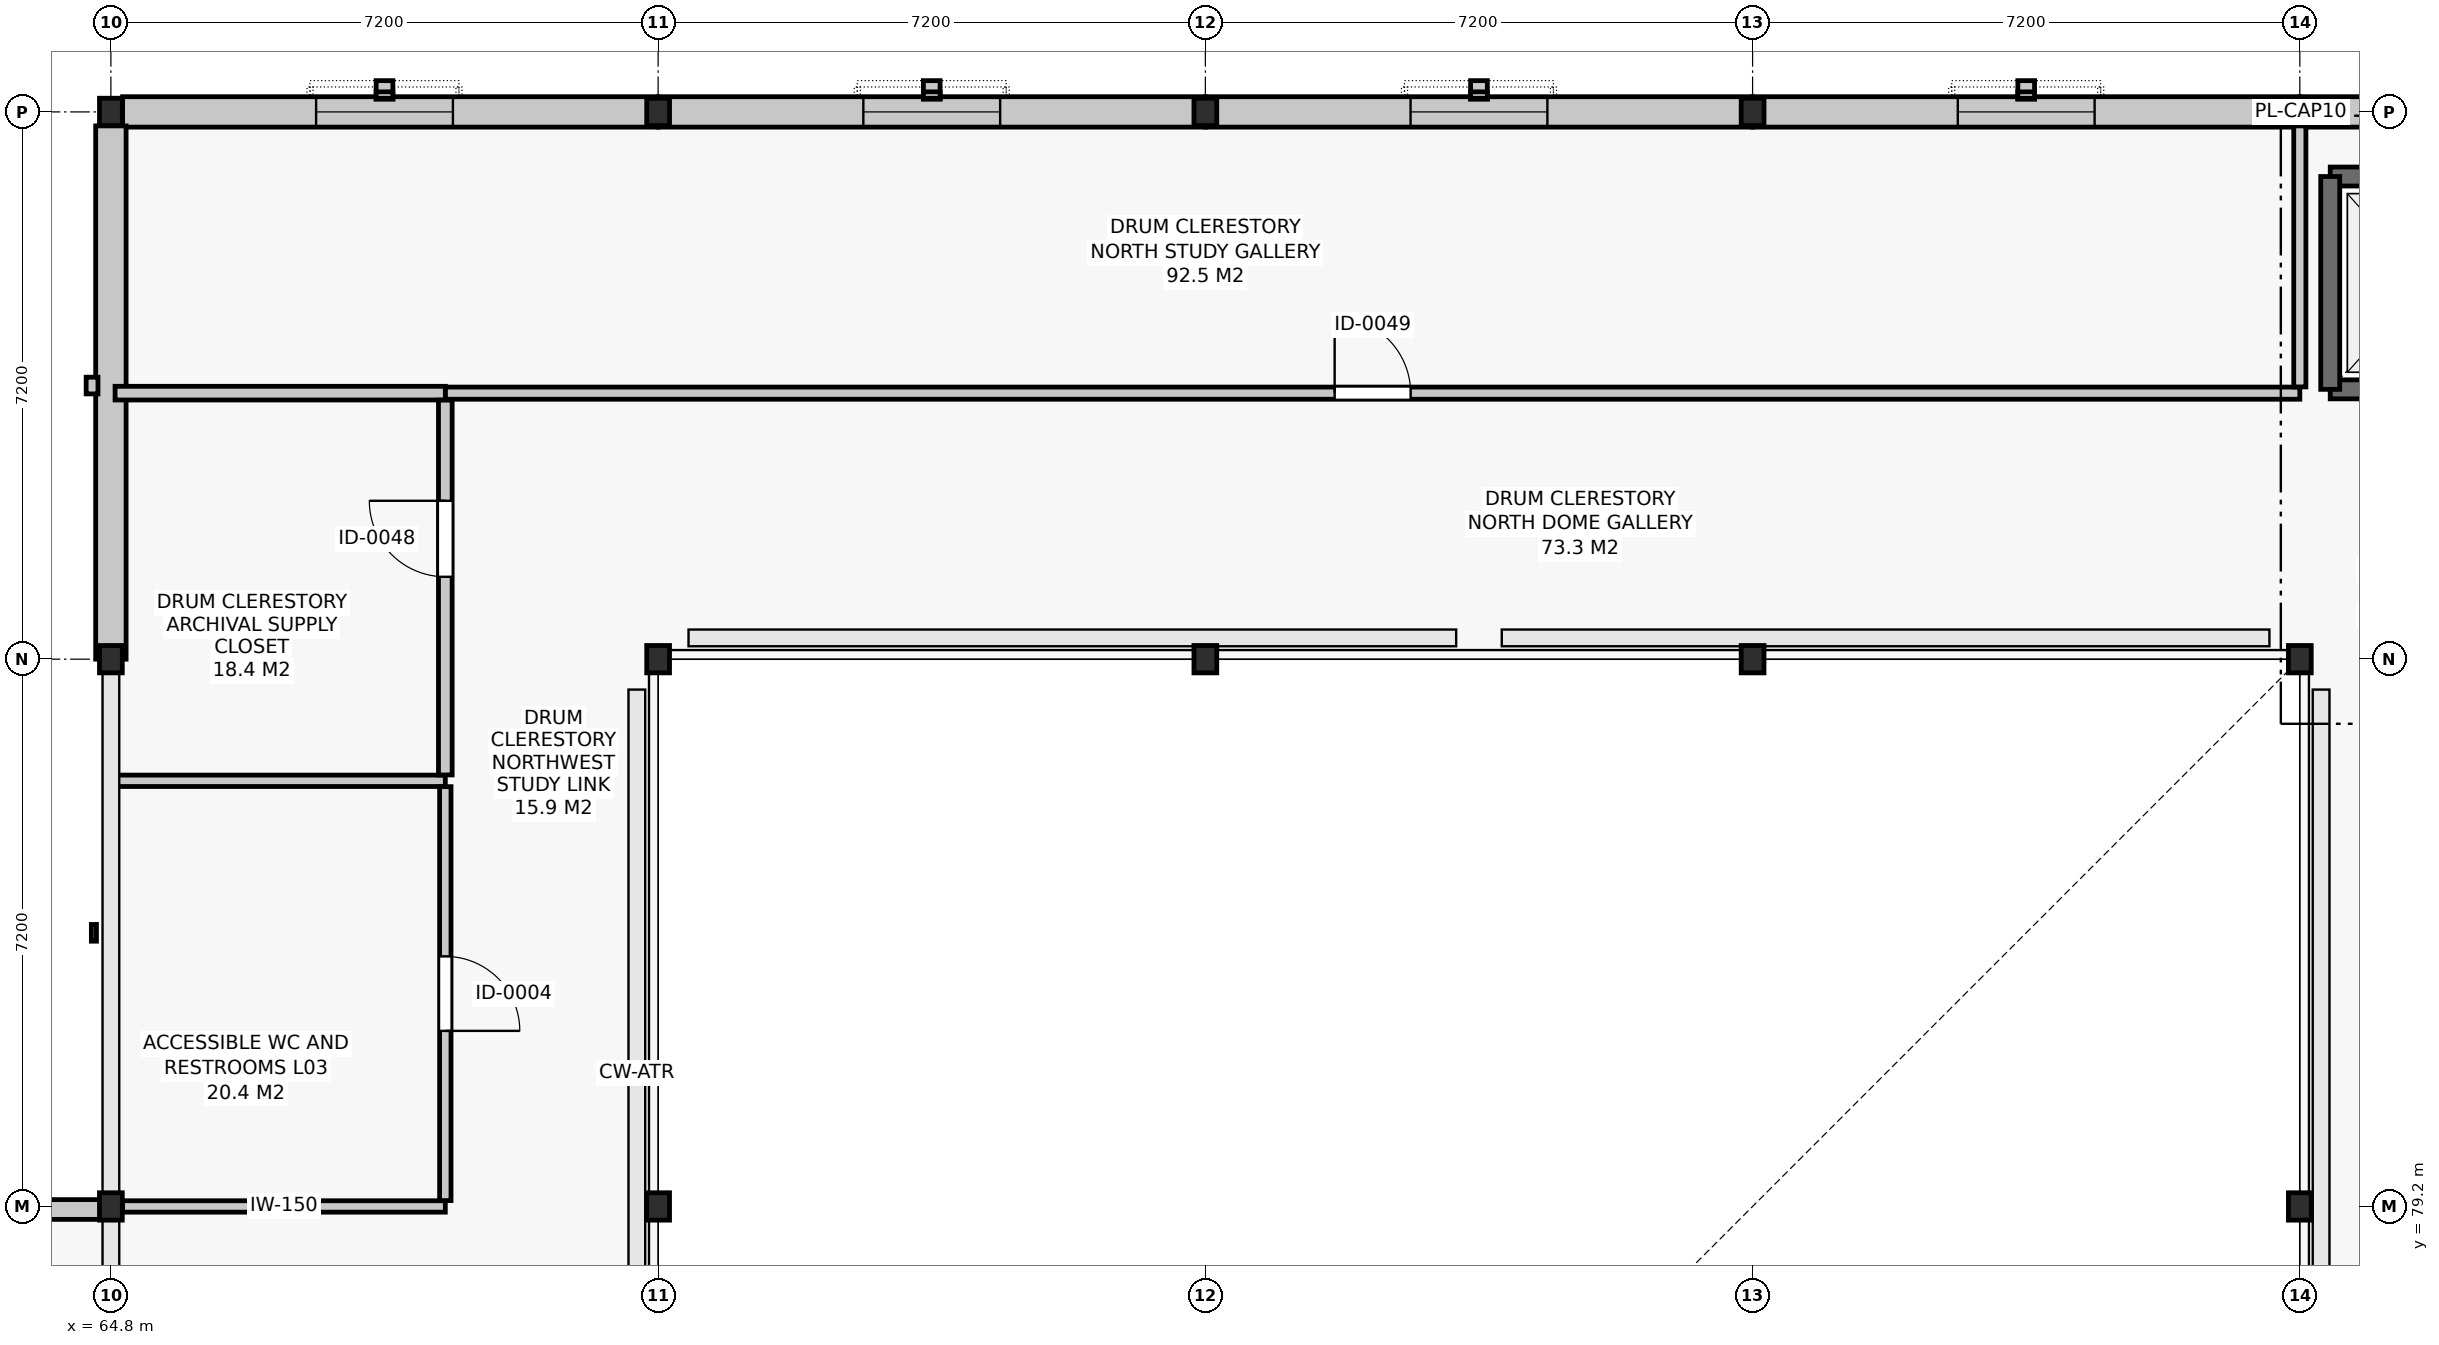
"""IFC4 building model, lengths in metres.
Left out: names, types, materials, properties, quantities, classifications, styles, units other than length and angle.
Written with IfcOpenShell. Run it as: python <this file> out.ifc"""

import sys

from ifc_helpers import new_model, si_unit, direction, frame, frame_2d, origin, origin_2d, place, context, subcontext, project, spatial, rectangle, i_section, extrude, element, fill, save


model = new_model("IFC4")
c1 = context("Model", 3, precision=1e-05, world=origin(), true_north=direction((0.0, 1.0)))
c2 = subcontext(c1, "Body", "Model", "MODEL_VIEW")
j1 = project(units=[si_unit("LENGTHUNIT", "METRE"), si_unit("PLANEANGLEUNIT", "RADIAN")], contexts=[c1])
p1 = place(None, origin())
s1 = spatial("IfcSite", under=j1, at=p1, CompositionType="ELEMENT")
p2 = place(p1, origin())
s2 = spatial("IfcBuilding", under=s1, at=p2, CompositionType="ELEMENT")
p3 = place(p2, frame((0.0, 0.0, 14.4)))
s3 = spatial("IfcBuildingStorey", under=s2, at=p3, CompositionType="ELEMENT", Elevation=14.4)
for number, where, z_axis, x_axis in (
    (1, (64.8, 79.2, 0.0), (0.0, 0.0, 1.0), (1.0, 0.0, 0.0)),
    (2, (64.8, 86.4, 0.0), (0.0, 0.0, 1.0), (1.0, 0.0, 0.0)),
    (3, (64.8, 93.6, 0.0), (0.0, 0.0, 1.0), (1.0, 0.0, 0.0)),
    (4, (72.0, 79.2, 0.0), (0.0, 0.0, 1.0), (1.0, 0.0, 0.0)),
    (5, (72.0, 86.4, 0.0), (0.0, 0.0, 1.0), (1.0, 0.0, 0.0)),
    (6, (72.0, 93.6, 0.0), (0.0, 0.0, 1.0), (1.0, 0.0, 0.0)),
    (7, (79.2, 86.4, 0.0), (0.0, 0.0, 1.0), (1.0, 0.0, 0.0)),
    (8, (79.2, 93.6, 0.0), (0.0, 0.0, 1.0), (1.0, 0.0, 0.0)),
    (9, (86.4, 86.4, 0.0), (0.0, 0.0, 1.0), (1.0, 0.0, 0.0)),
    (10, (86.4, 93.6, 0.0), (0.0, 0.0, 1.0), (1.0, 0.0, 0.0)),
    (11, (93.6, 79.2, 0.0), (0.0, 0.0, 1.0), (1.0, 0.0, 0.0)),
    (12, (93.6, 86.4, 0.0), (0.0, 0.0, 1.0), (1.0, 0.0, 0.0)),
    (13, (93.6, 93.6, 0.0), (0.0, 0.0, 1.0), (1.0, 0.0, 0.0)),
):
    element("IfcColumn", number, at=place(p3, frame(where, z_axis=z_axis, x_axis=x_axis)), inside=s3, PredefinedType="COLUMN", context=c2, shape_type="SweptSolid", body=[
        extrude(i_section(OverallWidth=0.3, OverallDepth=0.36, WebThickness=0.012, FlangeThickness=0.022, FilletRadius=0.027, at=origin_2d()), origin(), (0.0, 0.0, 1.0), 4.2),
    ])
p4 = place(p3, frame((100.646, 93.6, 0.0), z_axis=(0.0, 0.0, 1.0), x_axis=(-1.0, 0.0, 0.0)))
e14 = element("IfcWall", 14, at=p4, inside=s3, PredefinedType="SOLIDWALL", context=c2, shape_type="SweptSolid", body=[
    extrude(rectangle(XDim=7.046, YDim=0.4, at=frame_2d((3.523, 0.0))), origin(), (0.0, 0.0, 1.0), 3.24),
])
p5 = place(p3, frame((93.6, 93.6, 0.0), z_axis=(0.0, 0.0, 1.0), x_axis=(-1.0, 0.0, 0.0)))
e15 = element("IfcWall", 15, at=p5, inside=s3, PredefinedType="SOLIDWALL", context=c2, shape_type="SweptSolid", body=[
    extrude(rectangle(XDim=7.2, YDim=0.4, at=frame_2d((3.6, 0.0))), origin(), (0.0, 0.0, 1.0), 3.24),
])
p6 = place(p5, frame((2.7, 0.0, 0.95)))
e16 = element("IfcOpeningElement", 16, at=p6, cuts=e15, PredefinedType="OPENING", context=c2, shape_type="SweptSolid", body=[
    extrude(rectangle(XDim=1.8, YDim=2.05, at=frame_2d((0.9, 1.025))), frame((0.0, 0.212, 0.0), z_axis=(0.0, -1.0, 0.0), x_axis=(1.0, 0.0, 0.0)), (0.0, 0.0, 1.0), 0.424),
])
p7 = place(p3, frame((86.4, 93.6, 0.0), z_axis=(0.0, 0.0, 1.0), x_axis=(-1.0, 0.0, 0.0)))
e17 = element("IfcWall", 17, at=p7, inside=s3, PredefinedType="SOLIDWALL", context=c2, shape_type="SweptSolid", body=[
    extrude(rectangle(XDim=7.2, YDim=0.4, at=frame_2d((3.6, 0.0))), origin(), (0.0, 0.0, 1.0), 3.24),
])
p8 = place(p7, frame((2.7, 0.0, 0.95)))
e18 = element("IfcOpeningElement", 18, at=p8, cuts=e17, PredefinedType="OPENING", context=c2, shape_type="SweptSolid", body=[
    extrude(rectangle(XDim=1.8, YDim=2.05, at=frame_2d((0.9, 1.025))), frame((0.0, 0.212, 0.0), z_axis=(0.0, -1.0, 0.0), x_axis=(1.0, 0.0, 0.0)), (0.0, 0.0, 1.0), 0.424),
])
p9 = place(p3, frame((79.2, 93.6, 0.0), z_axis=(0.0, 0.0, 1.0), x_axis=(-1.0, 0.0, 0.0)))
e19 = element("IfcWall", 19, at=p9, inside=s3, PredefinedType="SOLIDWALL", context=c2, shape_type="SweptSolid", body=[
    extrude(rectangle(XDim=7.2, YDim=0.4, at=frame_2d((3.6, 0.0))), origin(), (0.0, 0.0, 1.0), 3.24),
])
p10 = place(p9, frame((2.7, 0.0, 0.95)))
e20 = element("IfcOpeningElement", 20, at=p10, cuts=e19, PredefinedType="OPENING", context=c2, shape_type="SweptSolid", body=[
    extrude(rectangle(XDim=1.8, YDim=2.05, at=frame_2d((0.9, 1.025))), frame((0.0, 0.212, 0.0), z_axis=(0.0, -1.0, 0.0), x_axis=(1.0, 0.0, 0.0)), (0.0, 0.0, 1.0), 0.424),
])
p11 = place(p3, frame((72.0, 93.6, 0.0), z_axis=(0.0, 0.0, 1.0), x_axis=(-1.0, 0.0, 0.0)))
e21 = element("IfcWall", 21, at=p11, inside=s3, PredefinedType="SOLIDWALL", context=c2, shape_type="SweptSolid", body=[
    extrude(rectangle(XDim=7.046, YDim=0.4, at=frame_2d((3.523, 0.0))), origin(), (0.0, 0.0, 1.0), 3.24),
])
p12 = place(p11, frame((2.7, 0.0, 0.95)))
e22 = element("IfcOpeningElement", 22, at=p12, cuts=e21, PredefinedType="OPENING", context=c2, shape_type="SweptSolid", body=[
    extrude(rectangle(XDim=1.8, YDim=2.05, at=frame_2d((0.9, 1.025))), frame((0.0, 0.212, 0.0), z_axis=(0.0, -1.0, 0.0), x_axis=(1.0, 0.0, 0.0)), (0.0, 0.0, 1.0), 0.424),
])
p13 = place(p3, frame((64.8, 93.416, 0.0), z_axis=(0.0, 0.0, 1.0), x_axis=(0.0, -1.0, 0.0)))
e23 = element("IfcWall", 23, at=p13, inside=s3, PredefinedType="SOLIDWALL", context=c2, shape_type="SweptSolid", body=[
    extrude(rectangle(XDim=7.016, YDim=0.4, at=frame_2d((3.508, 0.0))), origin(), (0.0, 0.0, 1.0), 3.24),
])
p14 = place(p3, frame((64.76, 79.16, 0.0), z_axis=(0.0, 0.0, 1.0), x_axis=(-1.0, 0.0, 0.0)))
e24 = element("IfcWall", 24, at=p14, inside=s3, PredefinedType="PARAPET", context=c2, shape_type="SweptSolid", body=[
    extrude(rectangle(XDim=7.12, YDim=0.26, at=frame_2d((3.56, 0.0))), origin(), (0.0, 0.0, 1.0), 0.9),
])
p15 = place(p3, frame((94.0, 89.95, 0.0), z_axis=(0.0, 0.0, 1.0), x_axis=(1.0, 0.0, 0.0)))
e25 = element("IfcWall", 25, at=p15, inside=s3, PredefinedType="SHEAR", context=c2, shape_type="SweptSolid", body=[
    extrude(rectangle(XDim=2.55, YDim=0.25, at=frame_2d((1.275, 0.0))), origin(), (0.0, 0.0, 1.0), 3.96),
])
p16 = place(p15, frame((0.725, 0.0, 0.0)))
e26 = element("IfcOpeningElement", 26, at=p16, cuts=e25, PredefinedType="OPENING", context=c2, shape_type="SweptSolid", body=[
    extrude(rectangle(XDim=1.1, YDim=2.1, at=frame_2d((0.55, 1.05))), frame((0.0, 0.137, 0.0), z_axis=(0.0, -1.0, 0.0), x_axis=(1.0, 0.0, 0.0)), (0.0, 0.0, 1.0), 0.274),
])
p17 = place(p3, frame((96.55, 92.75, 0.0), z_axis=(0.0, 0.0, 1.0), x_axis=(-1.0, 0.0, 0.0)))
e27 = element("IfcWall", 27, at=p17, inside=s3, PredefinedType="SHEAR", context=c2, shape_type="SweptSolid", body=[
    extrude(rectangle(XDim=2.55, YDim=0.25, at=frame_2d((1.275, 0.0))), origin(), (0.0, 0.0, 1.0), 3.96),
])
p18 = place(p3, frame((94.0, 92.75, 0.0), z_axis=(0.0, 0.0, 1.0), x_axis=(0.0, -1.0, 0.0)))
e28 = element("IfcWall", 28, at=p18, inside=s3, PredefinedType="SHEAR", context=c2, shape_type="SweptSolid", body=[
    extrude(rectangle(XDim=2.8, YDim=0.25, at=frame_2d((1.4, 0.0))), origin(), (0.0, 0.0, 1.0), 3.96),
])
p19 = place(p3, frame((64.954, 79.2, 0.0), z_axis=(0.0, 0.0, 1.0), x_axis=(1.0, 0.0, 0.0)))
e29 = element("IfcWall", 29, at=p19, inside=s3, PredefinedType="PARTITIONING", context=c2, shape_type="SweptSolid", body=[
    extrude(rectangle(XDim=4.246, YDim=0.15, at=frame_2d((2.123, 0.0))), origin(), (0.0, 0.0, 1.0), 3.135),
])
p20 = place(p3, frame((64.855, 84.8, 0.0), z_axis=(0.0, 0.0, 1.0), x_axis=(1.0, 0.0, 0.0)))
e30 = element("IfcWall", 30, at=p20, inside=s3, PredefinedType="PARTITIONING", context=c2, shape_type="SweptSolid", body=[
    extrude(rectangle(XDim=4.345, YDim=0.15, at=frame_2d((2.172, 0.0))), origin(), (0.0, 0.0, 1.0), 3.395),
])
p21 = place(p3, frame((64.855, 89.9, 0.0), z_axis=(0.0, 0.0, 1.0), x_axis=(1.0, 0.0, 0.0)))
e31 = element("IfcWall", 31, at=p21, inside=s3, PredefinedType="PARTITIONING", context=c2, shape_type="SweptSolid", body=[
    extrude(rectangle(XDim=4.345, YDim=0.18, at=frame_2d((2.172, 0.0))), origin(), (0.0, 0.0, 1.0), 3.395),
])
p22 = place(p3, frame((69.202, 89.9, 0.0), z_axis=(0.0, 0.0, 1.0), x_axis=(1.0, 0.0, 0.0)))
e32 = element("IfcWall", 32, at=p22, inside=s3, PredefinedType="PARTITIONING", context=c2, shape_type="SweptSolid", body=[
    extrude(rectangle(XDim=24.398, YDim=0.16, at=frame_2d((12.199, 0.0))), origin(), (0.0, 0.0, 1.0), 3.135),
])
p23 = place(p22, frame((11.699, 0.0, 0.0)))
e33 = element("IfcOpeningElement", 33, at=p23, cuts=e32, PredefinedType="OPENING", context=c2, shape_type="SweptSolid", body=[
    extrude(rectangle(XDim=1.0, YDim=2.15, at=frame_2d((0.5, 1.075))), frame((0.0, 0.092, 0.0), z_axis=(0.0, -1.0, 0.0), x_axis=(1.0, 0.0, 0.0)), (0.0, 0.0, 1.0), 0.184),
])
p24 = place(p3, frame((69.2, 79.277, 0.0), z_axis=(0.0, 0.0, 1.0), x_axis=(0.0, 1.0, 0.0)))
e34 = element("IfcWall", 34, at=p24, inside=s3, PredefinedType="PARTITIONING", context=c2, shape_type="SweptSolid", body=[
    extrude(rectangle(XDim=5.446, YDim=0.15, at=frame_2d((2.723, 0.0))), origin(), (0.0, 0.0, 1.0), 3.585),
])
p25 = place(p24, frame((2.233, 0.0, 0.0)))
e35 = element("IfcOpeningElement", 35, at=p25, cuts=e34, PredefinedType="OPENING", context=c2, shape_type="SweptSolid", body=[
    extrude(rectangle(XDim=0.98, YDim=2.1, at=frame_2d((0.49, 1.05))), frame((0.0, 0.087, 0.0), z_axis=(0.0, -1.0, 0.0), x_axis=(1.0, 0.0, 0.0)), (0.0, 0.0, 1.0), 0.174),
])
p26 = place(p3, frame((69.2, 84.877, 0.0), z_axis=(0.0, 0.0, 1.0), x_axis=(0.0, 1.0, 0.0)))
e36 = element("IfcWall", 36, at=p26, inside=s3, PredefinedType="PARTITIONING", context=c2, shape_type="SweptSolid", body=[
    extrude(rectangle(XDim=4.931, YDim=0.18, at=frame_2d((2.466, 0.0))), origin(), (0.0, 0.0, 1.0), 3.585),
])
p27 = place(p26, frame((2.607, 0.0, 0.0)))
e37 = element("IfcOpeningElement", 37, at=p27, cuts=e36, PredefinedType="OPENING", context=c2, shape_type="SweptSolid", body=[
    extrude(rectangle(XDim=1.0, YDim=2.15, at=frame_2d((0.5, 1.075))), frame((0.0, 0.102, 0.0), z_axis=(0.0, -1.0, 0.0), x_axis=(1.0, 0.0, 0.0)), (0.0, 0.0, 1.0), 0.204),
])
p28 = place(p3, frame((93.6, 89.982, 0.0), z_axis=(0.0, 0.0, 1.0), x_axis=(0.0, 1.0, 0.0)))
e38 = element("IfcWall", 38, at=p28, inside=s3, PredefinedType="PARTITIONING", context=c2, shape_type="SweptSolid", body=[
    extrude(rectangle(XDim=3.434, YDim=0.16, at=frame_2d((1.717, 0.0))), origin(), (0.0, 0.0, 1.0), 3.595),
])
p29 = place(p6, origin())
e39 = element("IfcWindow", 39, at=p29, inside=s3, PartitioningType="SINGLE_PANEL", PredefinedType="WINDOW", context=c2, shape_type="SweptSolid", body=[
    extrude(rectangle(XDim=1.8, YDim=2.05, at=frame_2d((0.9, 1.025))), frame((0.0, 0.03, 0.0), z_axis=(0.0, -1.0, 0.0), x_axis=(1.0, 0.0, 0.0)), (0.0, 0.0, 1.0), 0.06),
])
fill(e16, e39)
p30 = place(p8, origin())
e40 = element("IfcWindow", 40, at=p30, inside=s3, PartitioningType="SINGLE_PANEL", PredefinedType="WINDOW", context=c2, shape_type="SweptSolid", body=[
    extrude(rectangle(XDim=1.8, YDim=2.05, at=frame_2d((0.9, 1.025))), frame((0.0, 0.03, 0.0), z_axis=(0.0, -1.0, 0.0), x_axis=(1.0, 0.0, 0.0)), (0.0, 0.0, 1.0), 0.06),
])
fill(e18, e40)
p31 = place(p10, origin())
e41 = element("IfcWindow", 41, at=p31, inside=s3, PartitioningType="SINGLE_PANEL", PredefinedType="WINDOW", context=c2, shape_type="SweptSolid", body=[
    extrude(rectangle(XDim=1.8, YDim=2.05, at=frame_2d((0.9, 1.025))), frame((0.0, 0.03, 0.0), z_axis=(0.0, -1.0, 0.0), x_axis=(1.0, 0.0, 0.0)), (0.0, 0.0, 1.0), 0.06),
])
fill(e20, e41)
p32 = place(p12, origin())
e42 = element("IfcWindow", 42, at=p32, inside=s3, PartitioningType="SINGLE_PANEL", PredefinedType="WINDOW", context=c2, shape_type="SweptSolid", body=[
    extrude(rectangle(XDim=1.8, YDim=2.05, at=frame_2d((0.9, 1.025))), frame((0.0, 0.03, 0.0), z_axis=(0.0, -1.0, 0.0), x_axis=(1.0, 0.0, 0.0)), (0.0, 0.0, 1.0), 0.06),
])
fill(e22, e42)
p33 = place(p25, frame((0.98, 0.0, 0.0), z_axis=(0.0, 0.0, 1.0), x_axis=(-1.0, 0.0, 0.0)))
e43 = element("IfcDoor", 43, at=p33, inside=s3, OperationType="SINGLE_SWING_RIGHT", PredefinedType="DOOR", context=c2, shape_type="SweptSolid", body=[
    extrude(rectangle(XDim=0.98, YDim=2.1, at=frame_2d((0.49, 1.05))), frame((0.0, 0.025, 0.0), z_axis=(0.0, -1.0, 0.0), x_axis=(1.0, 0.0, 0.0)), (0.0, 0.0, 1.0), 0.05),
])
fill(e35, e43)
p34 = place(p27, origin())
e44 = element("IfcDoor", 44, at=p34, inside=s3, OperationType="SINGLE_SWING_RIGHT", PredefinedType="DOOR", context=c2, shape_type="SweptSolid", body=[
    extrude(rectangle(XDim=1.0, YDim=2.15, at=frame_2d((0.5, 1.075))), frame((0.0, 0.025, 0.0), z_axis=(0.0, -1.0, 0.0), x_axis=(1.0, 0.0, 0.0)), (0.0, 0.0, 1.0), 0.05),
])
fill(e37, e44)
p35 = place(p23, origin())
e45 = element("IfcDoor", 45, at=p35, inside=s3, OperationType="SINGLE_SWING_LEFT", PredefinedType="DOOR", context=c2, shape_type="SweptSolid", body=[
    extrude(rectangle(XDim=1.0, YDim=2.15, at=frame_2d((0.5, 1.075))), frame((0.0, 0.025, 0.0), z_axis=(0.0, -1.0, 0.0), x_axis=(1.0, 0.0, 0.0)), (0.0, 0.0, 1.0), 0.05),
])
fill(e33, e45)
save(model, sys.argv[1])
